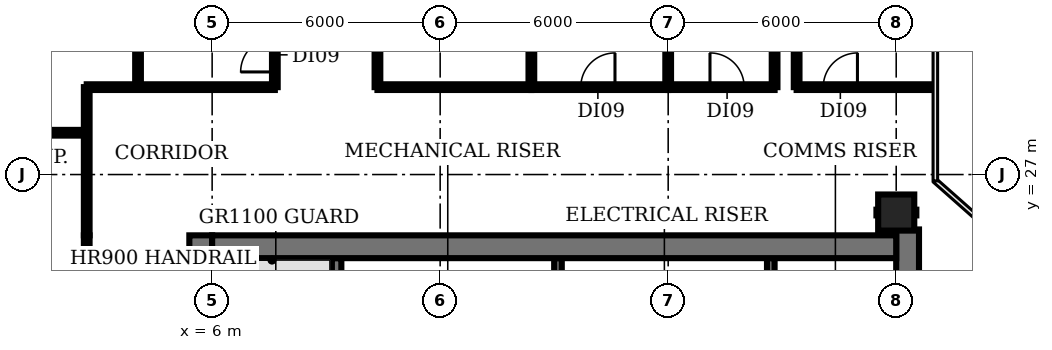
"""IFC4 building model, lengths in metres.
Left out: names, types, materials, properties, quantities, classifications, styles, units other than length and angle.
Written with IfcOpenShell. Run it as: python <this file> out.ifc"""

import sys

from ifc_helpers import new_model, si_unit, direction, frame, frame_2d, origin, origin_2d, place, context, subcontext, project, spatial, rectangle, circle, extrude, element, fill, save


model = new_model("IFC4")
c1 = context("Model", 3, precision=1e-05, world=origin(), true_north=direction((0.0, 1.0)))
c2 = subcontext(c1, "Body", "Model", "MODEL_VIEW")
j1 = project(units=[si_unit("LENGTHUNIT", "METRE"), si_unit("PLANEANGLEUNIT", "RADIAN")], contexts=[c1])
p1 = place(None, origin())
s1 = spatial("IfcSite", under=j1, at=p1, CompositionType="ELEMENT")
p2 = place(p1, origin())
s2 = spatial("IfcBuilding", under=s1, at=p2, CompositionType="ELEMENT")
p3 = place(p2, frame((0.0, 0.0, 184.4)))
s3 = spatial("IfcBuildingStorey", under=s2, at=p3, CompositionType="ELEMENT", Elevation=184.4)
p4 = place(p3, frame((24.0, 26.0, 0.0), z_axis=(0.0, 0.0, 1.0), x_axis=(1.0, 0.0, 0.0)))
e1 = element("IfcColumn", 1, at=p4, inside=s3, PredefinedType="COLUMN", context=c2, shape_type="SweptSolid", body=[
    extrude(circle(Radius=0.475, at=origin_2d()), origin(), (0.0, 0.0, 1.0), 3.85),
])
p5 = place(p3, frame((9.275, 18.375, 0.0), z_axis=(0.0, 0.0, 1.0), x_axis=(0.0, 1.0, 0.0)))
e2 = element("IfcWall", 2, at=p5, inside=s3, PredefinedType="SHEAR", context=c2, shape_type="SweptSolid", body=[
    extrude(rectangle(XDim=6.425, YDim=0.25, at=frame_2d((3.212, 0.0))), origin(), (0.0, 0.0, 1.0), 3.85),
])
for number, where, z_axis, x_axis in (
    (3, (15.1, 22.9, 0.0), (0.0, 0.0, 1.0), (0.0, 1.0, 0.0)),
    (4, (20.7, 22.9, 0.0), (0.0, 0.0, 1.0), (0.0, 1.0, 0.0)),
):
    element("IfcWall", number, at=place(p3, frame(where, z_axis=z_axis, x_axis=x_axis)), inside=s3, PredefinedType="SHEAR", context=c2, shape_type="SweptSolid", body=[
        extrude(rectangle(XDim=1.9, YDim=0.2, at=frame_2d((0.95, 0.0))), origin(), (0.0, 0.0, 1.0), 3.85),
    ])
p6 = place(p3, frame((5.7, 4.8, 0.0), z_axis=(0.0, 0.0, 1.0), x_axis=(0.0, 1.0, 0.0)))
e5 = element("IfcWall", 5, at=p6, inside=s3, PredefinedType="SHEAR", context=c2, shape_type="SweptSolid", body=[
    extrude(rectangle(XDim=20.6, YDim=0.6, at=frame_2d((10.3, 0.0))), origin(), (0.0, 0.0, 1.0), 3.85),
])
p7 = place(p6, frame((0.85, 0.0, 0.0)))
e6 = element("IfcOpeningElement", 6, at=p7, cuts=e5, PredefinedType="OPENING", context=c2, shape_type="SweptSolid", body=[
    extrude(rectangle(XDim=1.5, YDim=2.1, at=frame_2d((0.75, 1.05))), frame((0.0, 0.31, 0.0), z_axis=(0.0, -1.0, 0.0), x_axis=(1.0, 0.0, 0.0)), (0.0, 0.0, 1.0), 0.62),
])
p8 = place(p6, frame((7.3, 0.0, 0.0)))
e7 = element("IfcOpeningElement", 7, at=p8, cuts=e5, PredefinedType="OPENING", context=c2, shape_type="SweptSolid", body=[
    extrude(rectangle(XDim=1.2, YDim=2.1, at=frame_2d((0.6, 1.05))), frame((0.0, 0.31, 0.0), z_axis=(0.0, -1.0, 0.0), x_axis=(1.0, 0.0, 0.0)), (0.0, 0.0, 1.0), 0.62),
])
p9 = place(p6, frame((13.85, 0.0, 0.0)))
e8 = element("IfcOpeningElement", 8, at=p9, cuts=e5, PredefinedType="OPENING", context=c2, shape_type="SweptSolid", body=[
    extrude(rectangle(XDim=1.2, YDim=2.1, at=frame_2d((0.6, 1.05))), frame((0.0, 0.31, 0.0), z_axis=(0.0, -1.0, 0.0), x_axis=(1.0, 0.0, 0.0)), (0.0, 0.0, 1.0), 0.62),
])
p10 = place(p3, frame((24.3, 25.555, 0.0), z_axis=(0.0, 0.0, 1.0), x_axis=(0.0, -1.0, 0.0)))
e9 = element("IfcWall", 9, at=p10, inside=s3, PredefinedType="SHEAR", context=c2, shape_type="SweptSolid", body=[
    extrude(rectangle(XDim=20.755, YDim=0.6, at=frame_2d((10.377, 0.0))), origin(), (0.0, 0.0, 1.0), 3.85),
])
p11 = place(p10, frame((18.405, 0.0, 0.0)))
e10 = element("IfcOpeningElement", 10, at=p11, cuts=e9, PredefinedType="OPENING", context=c2, shape_type="SweptSolid", body=[
    extrude(rectangle(XDim=1.5, YDim=2.1, at=frame_2d((0.75, 1.05))), frame((0.0, 0.31, 0.0), z_axis=(0.0, -1.0, 0.0), x_axis=(1.0, 0.0, 0.0)), (0.0, 0.0, 1.0), 0.62),
])
p12 = place(p10, frame((12.305, 0.0, 0.0)))
e11 = element("IfcOpeningElement", 11, at=p12, cuts=e9, PredefinedType="OPENING", context=c2, shape_type="SweptSolid", body=[
    extrude(rectangle(XDim=0.9, YDim=2.1, at=frame_2d((0.45, 1.05))), frame((0.0, 0.31, 0.0), z_axis=(0.0, -1.0, 0.0), x_axis=(1.0, 0.0, 0.0)), (0.0, 0.0, 1.0), 0.62),
])
p13 = place(p10, frame((6.305, 0.0, 0.0)))
e12 = element("IfcOpeningElement", 12, at=p13, cuts=e9, PredefinedType="OPENING", context=c2, shape_type="SweptSolid", body=[
    extrude(rectangle(XDim=2.0, YDim=2.1, at=frame_2d((1.0, 1.05))), frame((0.0, 0.31, 0.0), z_axis=(0.0, -1.0, 0.0), x_axis=(1.0, 0.0, 0.0)), (0.0, 0.0, 1.0), 0.62),
])
p14 = place(p3, frame((6.0, 25.1, 0.0), z_axis=(0.0, 0.0, 1.0), x_axis=(1.0, 0.0, 0.0)))
e13 = element("IfcWall", 13, at=p14, inside=s3, PredefinedType="SHEAR", context=c2, shape_type="SweptSolid", body=[
    extrude(rectangle(XDim=18.0, YDim=0.6, at=frame_2d((9.0, 0.0))), origin(), (0.0, 0.0, 1.0), 3.85),
])
p15 = place(p3, frame((-0.98, 28.1, 0.0), z_axis=(0.0, 0.0, 1.0), x_axis=(1.0, 0.0, 0.0)))
e14 = element("IfcWall", 14, at=p15, inside=s3, PredefinedType="PARTITIONING", context=c2, shape_type="SweptSolid", body=[
    extrude(rectangle(XDim=3.68, YDim=0.15, at=frame_2d((1.84, 0.0))), origin(), (0.0, 0.0, 1.0), 2.88),
])
p16 = place(p3, frame((2.7, 4.8, 0.0), z_axis=(0.0, 0.0, 1.0), x_axis=(0.0, 1.0, 0.0)))
e15 = element("IfcWall", 15, at=p16, inside=s3, PredefinedType="PARTITIONING", context=c2, shape_type="SweptSolid", body=[
    extrude(rectangle(XDim=20.6, YDim=0.15, at=frame_2d((10.3, 0.0))), origin(), (0.0, 0.0, 1.0), 2.88),
])
p17 = place(p16, frame((10.2, 0.0, 0.0)))
e16 = element("IfcOpeningElement", 16, at=p17, cuts=e15, PredefinedType="OPENING", context=c2, shape_type="SweptSolid", body=[
    extrude(rectangle(XDim=1.2, YDim=2.1, at=frame_2d((0.6, 1.05))), frame((0.0, 0.085, 0.0), z_axis=(0.0, -1.0, 0.0), x_axis=(1.0, 0.0, 0.0)), (0.0, 0.0, 1.0), 0.17),
])
p18 = place(p3, frame((2.7, 25.4, 0.0), z_axis=(0.0, 0.0, 1.0), x_axis=(0.0, 1.0, 0.0)))
e17 = element("IfcWall", 17, at=p18, inside=s3, PredefinedType="PARTITIONING", context=c2, shape_type="SweptSolid", body=[
    extrude(rectangle(XDim=3.9, YDim=0.15, at=frame_2d((1.95, 0.0))), origin(), (0.0, 0.0, 1.0), 2.88),
])
p19 = place(p3, frame((2.7, 29.3, 0.0), z_axis=(0.0, 0.0, 1.0), x_axis=(1.0, 0.0, 0.0)))
e18 = element("IfcWall", 18, at=p19, inside=s3, PredefinedType="PARTITIONING", context=c2, shape_type="SweptSolid", body=[
    extrude(rectangle(XDim=4.95, YDim=0.15, at=frame_2d((2.475, 0.0))), origin(), (0.0, 0.0, 1.0), 2.88),
])
p20 = place(p3, frame((4.05, 29.3, 0.0), z_axis=(0.0, 0.0, 1.0), x_axis=(0.0, 1.0, 0.0)))
e19 = element("IfcWall", 19, at=p20, inside=s3, PredefinedType="PARTITIONING", context=c2, shape_type="SweptSolid", body=[
    extrude(rectangle(XDim=4.8, YDim=0.15, at=frame_2d((2.4, 0.0))), origin(), (0.0, 0.0, 1.0), 2.88),
])
p21 = place(p3, frame((7.65, 29.3, 0.0), z_axis=(0.0, 0.0, 1.0), x_axis=(0.0, 1.0, 0.0)))
e20 = element("IfcWall", 20, at=p21, inside=s3, PredefinedType="PARTITIONING", context=c2, shape_type="SweptSolid", body=[
    extrude(rectangle(XDim=4.8, YDim=0.15, at=frame_2d((2.4, 0.0))), origin(), (0.0, 0.0, 1.0), 2.88),
])
p22 = place(p21, frame((0.4, 0.0, 0.0)))
e21 = element("IfcOpeningElement", 21, at=p22, cuts=e20, PredefinedType="OPENING", context=c2, shape_type="SweptSolid", body=[
    extrude(rectangle(XDim=0.9, YDim=2.1, at=frame_2d((0.45, 1.05))), frame((0.0, 0.085, 0.0), z_axis=(0.0, -1.0, 0.0), x_axis=(1.0, 0.0, 0.0)), (0.0, 0.0, 1.0), 0.17),
])
p23 = place(p3, frame((10.35, 29.3, 0.0), z_axis=(0.0, 0.0, 1.0), x_axis=(0.0, 1.0, 0.0)))
e22 = element("IfcWall", 22, at=p23, inside=s3, PredefinedType="PARTITIONING", context=c2, shape_type="SweptSolid", body=[
    extrude(rectangle(XDim=4.8, YDim=0.15, at=frame_2d((2.4, 0.0))), origin(), (0.0, 0.0, 1.0), 2.88),
])
p24 = place(p3, frame((10.35, 29.3, 0.0), z_axis=(0.0, 0.0, 1.0), x_axis=(1.0, 0.0, 0.0)))
e23 = element("IfcWall", 23, at=p24, inside=s3, PredefinedType="PARTITIONING", context=c2, shape_type="SweptSolid", body=[
    extrude(rectangle(XDim=4.05, YDim=0.15, at=frame_2d((2.025, 0.0))), origin(), (0.0, 0.0, 1.0), 2.88),
])
p25 = place(p3, frame((14.4, 29.3, 0.0), z_axis=(0.0, 0.0, 1.0), x_axis=(0.0, 1.0, 0.0)))
e24 = element("IfcWall", 24, at=p25, inside=s3, PredefinedType="PARTITIONING", context=c2, shape_type="SweptSolid", body=[
    extrude(rectangle(XDim=4.8, YDim=0.15, at=frame_2d((2.4, 0.0))), origin(), (0.0, 0.0, 1.0), 2.88),
])
p26 = place(p3, frame((14.4, 29.3, 0.0), z_axis=(0.0, 0.0, 1.0), x_axis=(1.0, 0.0, 0.0)))
e25 = element("IfcWall", 25, at=p26, inside=s3, PredefinedType="PARTITIONING", context=c2, shape_type="SweptSolid", body=[
    extrude(rectangle(XDim=3.6, YDim=0.15, at=frame_2d((1.8, 0.0))), origin(), (0.0, 0.0, 1.0), 2.88),
])
p27 = place(p26, frame((1.3, 0.0, 0.0)))
e26 = element("IfcOpeningElement", 26, at=p27, cuts=e25, PredefinedType="OPENING", context=c2, shape_type="SweptSolid", body=[
    extrude(rectangle(XDim=0.9, YDim=2.1, at=frame_2d((0.45, 1.05))), frame((0.0, 0.085, 0.0), z_axis=(0.0, -1.0, 0.0), x_axis=(1.0, 0.0, 0.0)), (0.0, 0.0, 1.0), 0.17),
])
p28 = place(p3, frame((18.0, 29.3, 0.0), z_axis=(0.0, 0.0, 1.0), x_axis=(0.0, 1.0, 0.0)))
e27 = element("IfcWall", 27, at=p28, inside=s3, PredefinedType="PARTITIONING", context=c2, shape_type="SweptSolid", body=[
    extrude(rectangle(XDim=4.8, YDim=0.15, at=frame_2d((2.4, 0.0))), origin(), (0.0, 0.0, 1.0), 2.88),
])
p29 = place(p3, frame((18.0, 29.3, 0.0), z_axis=(0.0, 0.0, 1.0), x_axis=(1.0, 0.0, 0.0)))
e28 = element("IfcWall", 28, at=p29, inside=s3, PredefinedType="PARTITIONING", context=c2, shape_type="SweptSolid", body=[
    extrude(rectangle(XDim=2.8, YDim=0.15, at=frame_2d((1.4, 0.0))), origin(), (0.0, 0.0, 1.0), 2.88),
])
p30 = place(p29, frame((1.1, 0.0, 0.0)))
e29 = element("IfcOpeningElement", 29, at=p30, cuts=e28, PredefinedType="OPENING", context=c2, shape_type="SweptSolid", body=[
    extrude(rectangle(XDim=0.9, YDim=2.1, at=frame_2d((0.45, 1.05))), frame((0.0, 0.085, 0.0), z_axis=(0.0, -1.0, 0.0), x_axis=(1.0, 0.0, 0.0)), (0.0, 0.0, 1.0), 0.17),
])
for number, where, z_axis, x_axis in (
    (30, (20.8, 29.3, 0.0), (0.0, 0.0, 1.0), (0.0, 1.0, 0.0)),
    (31, (21.38, 29.3, 0.0), (0.0, 0.0, 1.0), (0.0, 1.0, 0.0)),
):
    element("IfcWall", number, at=place(p3, frame(where, z_axis=z_axis, x_axis=x_axis)), inside=s3, PredefinedType="PARTITIONING", context=c2, shape_type="SweptSolid", body=[
        extrude(rectangle(XDim=4.8, YDim=0.15, at=frame_2d((2.4, 0.0))), origin(), (0.0, 0.0, 1.0), 2.88),
    ])
p31 = place(p3, frame((21.38, 29.3, 0.0), z_axis=(0.0, 0.0, 1.0), x_axis=(1.0, 0.0, 0.0)))
e32 = element("IfcWall", 32, at=p31, inside=s3, PredefinedType="PARTITIONING", context=c2, shape_type="SweptSolid", body=[
    extrude(rectangle(XDim=3.6, YDim=0.15, at=frame_2d((1.8, 0.0))), origin(), (0.0, 0.0, 1.0), 2.88),
])
p32 = place(p31, frame((0.7, 0.0, 0.0)))
e33 = element("IfcOpeningElement", 33, at=p32, cuts=e32, PredefinedType="OPENING", context=c2, shape_type="SweptSolid", body=[
    extrude(rectangle(XDim=0.9, YDim=2.1, at=frame_2d((0.45, 1.05))), frame((0.0, 0.085, 0.0), z_axis=(0.0, -1.0, 0.0), x_axis=(1.0, 0.0, 0.0)), (0.0, 0.0, 1.0), 0.17),
])
p33 = place(p3, frame((23.48, 26.0, 0.0), z_axis=(0.0, 0.0, 1.0), x_axis=(1.0, 0.0, 0.0)))
e34 = element("IfcWall", 34, at=p33, inside=s3, PredefinedType="PARTITIONING", context=c2, shape_type="SweptSolid", body=[
    extrude(rectangle(XDim=1.05, YDim=0.15, at=frame_2d((0.525, 0.0))), origin(), (0.0, 0.0, 1.0), 2.88),
])
p34 = place(p22, origin())
e35 = element("IfcDoor", 35, at=p34, inside=s3, OperationType="SINGLE_SWING_LEFT", PredefinedType="DOOR", context=c2, shape_type="SweptSolid", body=[
    extrude(rectangle(XDim=0.9, YDim=2.1, at=frame_2d((0.45, 1.05))), frame((0.0, 0.025, 0.0), z_axis=(0.0, -1.0, 0.0), x_axis=(1.0, 0.0, 0.0)), (0.0, 0.0, 1.0), 0.05),
])
fill(e21, e35)
p35 = place(p27, origin())
e36 = element("IfcDoor", 36, at=p35, inside=s3, OperationType="SINGLE_SWING_RIGHT", PredefinedType="DOOR", context=c2, shape_type="SweptSolid", body=[
    extrude(rectangle(XDim=0.9, YDim=2.1, at=frame_2d((0.45, 1.05))), frame((0.0, 0.025, 0.0), z_axis=(0.0, -1.0, 0.0), x_axis=(1.0, 0.0, 0.0)), (0.0, 0.0, 1.0), 0.05),
])
fill(e26, e36)
p36 = place(p30, origin())
e37 = element("IfcDoor", 37, at=p36, inside=s3, OperationType="SINGLE_SWING_LEFT", PredefinedType="DOOR", context=c2, shape_type="SweptSolid", body=[
    extrude(rectangle(XDim=0.9, YDim=2.1, at=frame_2d((0.45, 1.05))), frame((0.0, 0.025, 0.0), z_axis=(0.0, -1.0, 0.0), x_axis=(1.0, 0.0, 0.0)), (0.0, 0.0, 1.0), 0.05),
])
fill(e29, e37)
p37 = place(p32, origin())
e38 = element("IfcDoor", 38, at=p37, inside=s3, OperationType="SINGLE_SWING_RIGHT", PredefinedType="DOOR", context=c2, shape_type="SweptSolid", body=[
    extrude(rectangle(XDim=0.9, YDim=2.1, at=frame_2d((0.45, 1.05))), frame((0.0, 0.025, 0.0), z_axis=(0.0, -1.0, 0.0), x_axis=(1.0, 0.0, 0.0)), (0.0, 0.0, 1.0), 0.05),
])
fill(e33, e38)
save(model, sys.argv[1])
